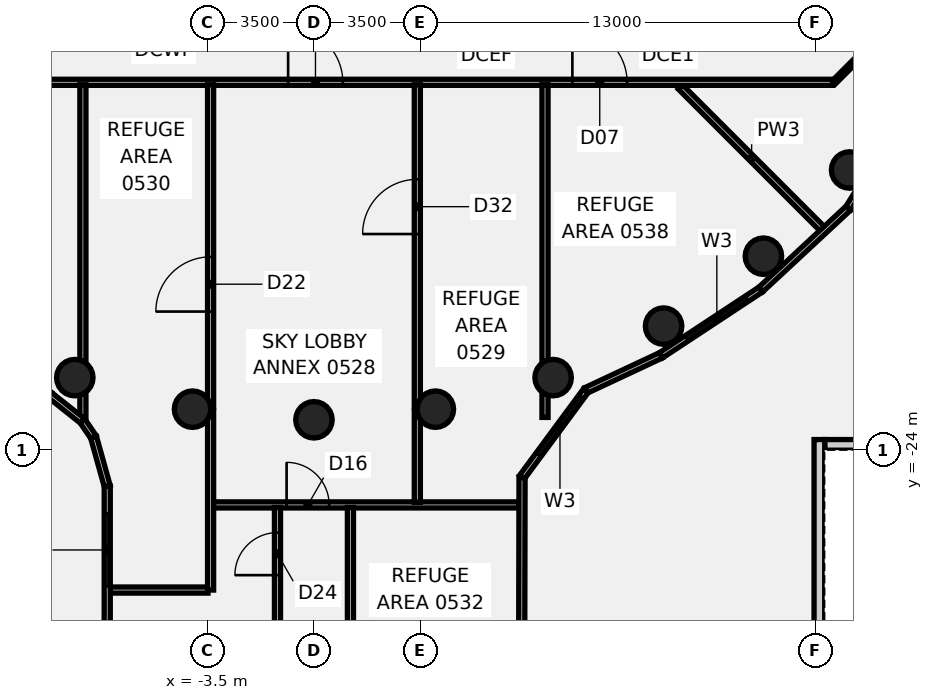
"""IFC4 building model, lengths in metres.
Left out: names, types, materials, properties, quantities, classifications, styles, units other than length and angle.
Written with IfcOpenShell. Run it as: python <this file> out.ifc"""

import sys

from ifc_helpers import new_model, si_unit, direction, frame, frame_2d, origin, origin_2d, place, context, subcontext, project, spatial, rectangle, circle, extrude, element, fill, save


model = new_model("IFC4")
c1 = context("Model", 3, precision=1e-05, world=origin(), true_north=direction((0.0, 1.0)))
c2 = subcontext(c1, "Body", "Model", "MODEL_VIEW")
j1 = project(units=[si_unit("LENGTHUNIT", "METRE"), si_unit("PLANEANGLEUNIT", "RADIAN")], contexts=[c1])
p1 = place(None, origin())
s1 = spatial("IfcSite", under=j1, at=p1, CompositionType="ELEMENT")
p2 = place(p1, origin())
s2 = spatial("IfcBuilding", under=s1, at=p2, CompositionType="ELEMENT")
p3 = place(p2, frame((0.0, 0.0, 29.5)))
s3 = spatial("IfcBuildingStorey", under=s2, at=p3, CompositionType="ELEMENT", Elevation=29.5)
for number, where, z_axis, x_axis in (
    (1, (-7.866, -21.613, -0.6), (0.0, 0.0, 1.0), (1.0, 0.0, 0.0)),
    (2, (-3.994, -22.651, -0.6), (0.0, 0.0, 1.0), (1.0, 0.0, 0.0)),
    (3, (0.0, -23.0, -0.6), (0.0, 0.0, 1.0), (1.0, 0.0, 0.0)),
    (4, (3.994, -22.651, -0.6), (0.0, 0.0, 1.0), (1.0, 0.0, 0.0)),
    (5, (7.866, -21.613, -0.6), (0.0, 0.0, 1.0), (1.0, 0.0, 0.0)),
    (6, (11.5, -19.919, -0.6), (0.0, 0.0, 1.0), (1.0, 0.0, 0.0)),
    (7, (14.784, -17.619, -0.6), (0.0, 0.0, 1.0), (1.0, 0.0, 0.0)),
    (8, (17.619, -14.784, -0.6), (0.0, 0.0, 1.0), (1.0, 0.0, 0.0)),
):
    element("IfcColumn", number, at=place(p3, frame(where, z_axis=z_axis, x_axis=x_axis)), inside=s3, PredefinedType="COLUMN", context=c2, shape_type="SweptSolid", body=[
        extrude(circle(Radius=0.6, at=origin_2d()), origin(), (0.0, 0.0, 1.0), 4.96),
    ])
p4 = place(p3, frame((12.052, -12.052, 0.0), z_axis=(0.0, 0.0, 1.0), x_axis=(0.707106781187, -0.707106781187, 0.0)))
e9 = element("IfcWall", 9, at=p4, inside=s3, PredefinedType="PARTITIONING", context=c2, shape_type="SweptSolid", body=[
    extrude(rectangle(XDim=6.631, YDim=0.2, at=frame_2d((3.315, 0.0))), origin(), (0.0, 0.0, 1.0), 3.76),
])
p5 = place(p3, frame((-17.1, -11.9, 0.0), z_axis=(0.0, 0.0, 1.0), x_axis=(1.0, 0.0, 0.0)))
e10 = element("IfcWall", 10, at=p5, inside=s3, PredefinedType="PARTITIONING", context=c2, shape_type="SweptSolid", body=[
    extrude(rectangle(XDim=34.165, YDim=0.2, at=frame_2d((17.083, 0.0))), origin(), (0.0, 0.0, 1.0), 3.76),
])
p6 = place(p5, frame((16.25, 0.0, 0.0)))
e11 = element("IfcOpeningElement", 11, at=p6, cuts=e10, PredefinedType="OPENING", context=c2, shape_type="SweptSolid", body=[
    extrude(rectangle(XDim=1.8, YDim=2.1, at=frame_2d((0.9, 1.05))), frame((0.0, 0.11, 0.0), z_axis=(0.0, -1.0, 0.0), x_axis=(1.0, 0.0, 0.0)), (0.0, 0.0, 1.0), 0.22),
])
p7 = place(p5, frame((2.1, 0.0, 0.0)))
e12 = element("IfcOpeningElement", 12, at=p7, cuts=e10, PredefinedType="OPENING", context=c2, shape_type="SweptSolid", body=[
    extrude(rectangle(XDim=1.8, YDim=2.1, at=frame_2d((0.9, 1.05))), frame((0.0, 0.11, 0.0), z_axis=(0.0, -1.0, 0.0), x_axis=(1.0, 0.0, 0.0)), (0.0, 0.0, 1.0), 0.22),
])
p8 = place(p5, frame((25.6, 0.0, 0.0)))
e13 = element("IfcOpeningElement", 13, at=p8, cuts=e10, PredefinedType="OPENING", context=c2, shape_type="SweptSolid", body=[
    extrude(rectangle(XDim=1.8, YDim=2.1, at=frame_2d((0.9, 1.05))), frame((0.0, 0.11, 0.0), z_axis=(0.0, -1.0, 0.0), x_axis=(1.0, 0.0, 0.0)), (0.0, 0.0, 1.0), 0.22),
])
p9 = place(p3, frame((-6.699, -28.6, 0.0), z_axis=(0.0, 0.0, 1.0), x_axis=(1.0, 0.0, 0.0)))
e14 = element("IfcWall", 14, at=p9, inside=s3, PredefinedType="PARTITIONING", context=c2, shape_type="SweptSolid", body=[
    extrude(rectangle(XDim=3.214, YDim=0.2, at=frame_2d((1.607, 0.0))), origin(), (0.0, 0.0, 1.0), 3.76),
])
p10 = place(p3, frame((-3.315, -25.8, 0.0), z_axis=(0.0, 0.0, 1.0), x_axis=(1.0, 0.0, 0.0)))
e15 = element("IfcWall", 15, at=p10, inside=s3, PredefinedType="PARTITIONING", context=c2, shape_type="SweptSolid", body=[
    extrude(rectangle(XDim=10.057, YDim=0.2, at=frame_2d((5.028, 0.0))), origin(), (0.0, 0.0, 1.0), 3.76),
])
p11 = place(p10, frame((2.415, 0.0, 0.0)))
e16 = element("IfcOpeningElement", 16, at=p11, cuts=e15, PredefinedType="OPENING", context=c2, shape_type="SweptSolid", body=[
    extrude(rectangle(XDim=1.4, YDim=2.1, at=frame_2d((0.7, 1.05))), frame((0.0, 0.11, 0.0), z_axis=(0.0, -1.0, 0.0), x_axis=(1.0, 0.0, 0.0)), (0.0, 0.0, 1.0), 0.22),
])
p12 = place(p3, frame((17.1, -11.9, 0.0), z_axis=(0.0, 0.0, 1.0), x_axis=(0.707106781187, 0.707106781187, 0.0)))
e17 = element("IfcWall", 17, at=p12, inside=s3, PredefinedType="PARTITIONING", context=c2, shape_type="SweptSolid", body=[
    extrude(rectangle(XDim=2.495, YDim=0.15, at=frame_2d((1.248, 0.0))), origin(), (0.0, 0.0, 1.0), 3.76),
])
p13 = place(p3, frame((-7.6, -22.921, 0.0), z_axis=(0.0, 0.0, 1.0), x_axis=(0.0, 1.0, 0.0)))
e18 = element("IfcWall", 18, at=p13, inside=s3, PredefinedType="PARTITIONING", context=c2, shape_type="SweptSolid", body=[
    extrude(rectangle(XDim=0.769, YDim=0.2, at=frame_2d((0.385, 0.0))), origin(), (0.0, 0.0, 1.0), 3.76),
])
p14 = place(p3, frame((-7.6, -21.074, 0.0), z_axis=(0.0, 0.0, 1.0), x_axis=(0.0, 1.0, 0.0)))
e19 = element("IfcWall", 19, at=p14, inside=s3, PredefinedType="PARTITIONING", context=c2, shape_type="SweptSolid", body=[
    extrude(rectangle(XDim=9.094, YDim=0.2, at=frame_2d((4.547, 0.0))), origin(), (0.0, 0.0, 1.0), 3.76),
])
p15 = place(p3, frame((-3.4, -28.6, 0.0), z_axis=(0.0, 0.0, 1.0), x_axis=(0.0, 1.0, 0.0)))
e20 = element("IfcWall", 20, at=p15, inside=s3, PredefinedType="PARTITIONING", context=c2, shape_type="SweptSolid", body=[
    extrude(rectangle(XDim=5.889, YDim=0.2, at=frame_2d((2.945, 0.0))), origin(), (0.0, 0.0, 1.0), 3.76),
])
p16 = place(p3, frame((-3.4, -22.591, 0.0), z_axis=(0.0, 0.0, 1.0), x_axis=(0.0, 1.0, 0.0)))
e21 = element("IfcWall", 21, at=p16, inside=s3, PredefinedType="PARTITIONING", context=c2, shape_type="SweptSolid", body=[
    extrude(rectangle(XDim=10.611, YDim=0.2, at=frame_2d((5.305, 0.0))), origin(), (0.0, 0.0, 1.0), 3.76),
])
p17 = place(p16, frame((3.15, 0.0, 0.0)))
e22 = element("IfcOpeningElement", 22, at=p17, cuts=e21, PredefinedType="OPENING", context=c2, shape_type="SweptSolid", body=[
    extrude(rectangle(XDim=1.8, YDim=2.1, at=frame_2d((0.9, 1.05))), frame((0.0, 0.11, 0.0), z_axis=(0.0, -1.0, 0.0), x_axis=(1.0, 0.0, 0.0)), (0.0, 0.0, 1.0), 0.22),
])
p18 = place(p3, frame((-1.2, -29.76, 0.0), z_axis=(0.0, 0.0, 1.0), x_axis=(0.0, 1.0, 0.0)))
e23 = element("IfcWall", 23, at=p18, inside=s3, PredefinedType="PARTITIONING", context=c2, shape_type="SweptSolid", body=[
    extrude(rectangle(XDim=3.875, YDim=0.2, at=frame_2d((1.938, 0.0))), origin(), (0.0, 0.0, 1.0), 3.76),
])
p19 = place(p18, frame((1.65, 0.0, 0.0)))
e24 = element("IfcOpeningElement", 24, at=p19, cuts=e23, PredefinedType="OPENING", context=c2, shape_type="SweptSolid", body=[
    extrude(rectangle(XDim=1.4, YDim=2.1, at=frame_2d((0.7, 1.05))), frame((0.0, 0.11, 0.0), z_axis=(0.0, -1.0, 0.0), x_axis=(1.0, 0.0, 0.0)), (0.0, 0.0, 1.0), 0.22),
])
p20 = place(p3, frame((1.2, -39.22, 0.0), z_axis=(0.0, 0.0, 1.0), x_axis=(0.0, 1.0, 0.0)))
e25 = element("IfcWall", 25, at=p20, inside=s3, PredefinedType="PARTITIONING", context=c2, shape_type="SweptSolid", body=[
    extrude(rectangle(XDim=13.335, YDim=0.2, at=frame_2d((6.667, 0.0))), origin(), (0.0, 0.0, 1.0), 3.76),
])
p21 = place(p20, frame((4.12, 0.0, 0.0)))
e26 = element("IfcOpeningElement", 26, at=p21, cuts=e25, PredefinedType="OPENING", context=c2, shape_type="SweptSolid", body=[
    extrude(rectangle(XDim=1.8, YDim=2.1, at=frame_2d((0.9, 1.05))), frame((0.0, 0.11, 0.0), z_axis=(0.0, -1.0, 0.0), x_axis=(1.0, 0.0, 0.0)), (0.0, 0.0, 1.0), 0.22),
])
p22 = place(p3, frame((3.4, -25.715, 0.0), z_axis=(0.0, 0.0, 1.0), x_axis=(0.0, 1.0, 0.0)))
e27 = element("IfcWall", 27, at=p22, inside=s3, PredefinedType="PARTITIONING", context=c2, shape_type="SweptSolid", body=[
    extrude(rectangle(XDim=3.004, YDim=0.2, at=frame_2d((1.502, 0.0))), origin(), (0.0, 0.0, 1.0), 3.76),
])
p23 = place(p3, frame((3.4, -22.591, 0.0), z_axis=(0.0, 0.0, 1.0), x_axis=(0.0, 1.0, 0.0)))
e28 = element("IfcWall", 28, at=p23, inside=s3, PredefinedType="PARTITIONING", context=c2, shape_type="SweptSolid", body=[
    extrude(rectangle(XDim=10.611, YDim=0.2, at=frame_2d((5.305, 0.0))), origin(), (0.0, 0.0, 1.0), 3.76),
])
p24 = place(p23, frame((5.7, 0.0, 0.0)))
e29 = element("IfcOpeningElement", 29, at=p24, cuts=e28, PredefinedType="OPENING", context=c2, shape_type="SweptSolid", body=[
    extrude(rectangle(XDim=1.8, YDim=2.1, at=frame_2d((0.9, 1.05))), frame((0.0, 0.11, 0.0), z_axis=(0.0, -1.0, 0.0), x_axis=(1.0, 0.0, 0.0)), (0.0, 0.0, 1.0), 0.22),
])
p25 = place(p3, frame((7.6, -22.922, 0.0), z_axis=(0.0, 0.0, 1.0), x_axis=(0.0, 1.0, 0.0)))
e30 = element("IfcWall", 30, at=p25, inside=s3, PredefinedType="PARTITIONING", context=c2, shape_type="SweptSolid", body=[
    extrude(rectangle(XDim=0.77, YDim=0.2, at=frame_2d((0.385, 0.0))), origin(), (0.0, 0.0, 1.0), 3.76),
])
p26 = place(p3, frame((7.6, -21.074, 0.0), z_axis=(0.0, 0.0, 1.0), x_axis=(0.0, 1.0, 0.0)))
e31 = element("IfcWall", 31, at=p26, inside=s3, PredefinedType="PARTITIONING", context=c2, shape_type="SweptSolid", body=[
    extrude(rectangle(XDim=9.094, YDim=0.2, at=frame_2d((4.547, 0.0))), origin(), (0.0, 0.0, 1.0), 3.76),
])
p27 = place(p3, frame((16.8, -23.825, 0.0), z_axis=(0.0, 0.0, 1.0), x_axis=(1.0, 0.0, 0.0)))
e32 = element("IfcWall", 32, at=p27, inside=s3, PredefinedType="SOLIDWALL", context=c2, shape_type="SweptSolid", body=[
    extrude(rectangle(XDim=26.7, YDim=0.35, at=frame_2d((13.35, 0.0))), origin(), (0.0, 0.0, 1.0), 1.2),
])
p28 = place(p3, frame((16.625, -42.35, 0.0), z_axis=(0.0, 0.0, 1.0), x_axis=(0.0, 1.0, 0.0)))
e33 = element("IfcWall", 33, at=p28, inside=s3, PredefinedType="SOLIDWALL", context=c2, shape_type="SweptSolid", body=[
    extrude(rectangle(XDim=18.7, YDim=0.35, at=frame_2d((9.35, 0.0))), origin(), (0.0, 0.0, 1.0), 1.2),
])
p29 = place(p3, frame((-8.687, -22.185, 0.0), z_axis=(0.0, 0.0, 1.0), x_axis=(0.782754463559, -0.62233065952, 0.0)))
e34 = element("IfcWall", 34, at=p29, inside=s3, PredefinedType="SOLIDWALL", context=c2, shape_type="SweptSolid", body=[
    extrude(rectangle(XDim=1.374, YDim=0.2, at=frame_2d((0.687, 0.0))), origin(), (0.0, 0.0, 1.0), 4.36),
])
p30 = place(p3, frame((-7.611, -23.041, 0.0), z_axis=(0.0, 0.0, 1.0), x_axis=(0.564082170033, -0.825718659987, 0.0)))
e35 = element("IfcWall", 35, at=p30, inside=s3, PredefinedType="SOLIDWALL", context=c2, shape_type="SweptSolid", body=[
    extrude(rectangle(XDim=0.64, YDim=0.2, at=frame_2d((0.32, 0.0))), origin(), (0.0, 0.0, 1.0), 4.36),
])
p31 = place(p3, frame((-7.25, -23.569, 0.0), z_axis=(0.0, 0.0, 1.0), x_axis=(0.268802114608, -0.963195423153, 0.0)))
e36 = element("IfcWall", 36, at=p31, inside=s3, PredefinedType="SOLIDWALL", context=c2, shape_type="SweptSolid", body=[
    extrude(rectangle(XDim=1.674, YDim=0.2, at=frame_2d((0.837, 0.0))), origin(), (0.0, 0.0, 1.0), 4.36),
])
p32 = place(p3, frame((-6.8, -25.181, 0.0), z_axis=(0.0, 0.0, 1.0), x_axis=(0.0, -1.0, 0.0)))
e37 = element("IfcWall", 37, at=p32, inside=s3, PredefinedType="SOLIDWALL", context=c2, shape_type="SweptSolid", body=[
    extrude(rectangle(XDim=22.3, YDim=0.2, at=frame_2d((11.15, 0.0))), origin(), (0.0, 0.0, 1.0), 4.36),
])
p33 = place(p32, frame((0.9, 0.0, 1.4)))
e38 = element("IfcOpeningElement", 38, at=p33, cuts=e37, PredefinedType="OPENING", context=c2, shape_type="SweptSolid", body=[
    extrude(rectangle(XDim=2.4, YDim=2.1, at=frame_2d((1.2, 1.05))), frame((0.0, 0.11, 0.0), z_axis=(0.0, -1.0, 0.0), x_axis=(1.0, 0.0, 0.0)), (0.0, 0.0, 1.0), 0.22),
])
p34 = place(p3, frame((6.8, -47.481, 0.0), z_axis=(0.0, 0.0, 1.0), x_axis=(0.001966415802, 0.999998066603, 0.0)))
e39 = element("IfcWall", 39, at=p34, inside=s3, PredefinedType="SOLIDWALL", context=c2, shape_type="SweptSolid", body=[
    extrude(rectangle(XDim=22.596, YDim=0.2, at=frame_2d((11.298, 0.0))), origin(), (0.0, 0.0, 1.0), 4.36),
])
p35 = place(p34, frame((3.3, 0.0, 1.4)))
e40 = element("IfcOpeningElement", 40, at=p35, cuts=e39, PredefinedType="OPENING", context=c2, shape_type="SweptSolid", body=[
    extrude(rectangle(XDim=2.4, YDim=2.1, at=frame_2d((1.2, 1.05))), frame((0.0, 0.11, 0.0), z_axis=(0.0, -1.0, 0.0), x_axis=(1.0, 0.0, 0.0)), (0.0, 0.0, 1.0), 0.22),
])
p36 = place(p34, frame((13.75, 0.0, 1.4)))
e41 = element("IfcOpeningElement", 41, at=p36, cuts=e39, PredefinedType="OPENING", context=c2, shape_type="SweptSolid", body=[
    extrude(rectangle(XDim=2.4, YDim=2.1, at=frame_2d((1.2, 1.05))), frame((0.0, 0.11, 0.0), z_axis=(0.0, -1.0, 0.0), x_axis=(1.0, 0.0, 0.0)), (0.0, 0.0, 1.0), 0.22),
])
p37 = place(p3, frame((6.844, -24.885, 0.0), z_axis=(0.0, 0.0, 1.0), x_axis=(0.594098572278, 0.804392246617, 0.0)))
e42 = element("IfcWall", 42, at=p37, inside=s3, PredefinedType="SOLIDWALL", context=c2, shape_type="SweptSolid", body=[
    extrude(rectangle(XDim=3.544, YDim=0.2, at=frame_2d((1.772, 0.0))), origin(), (0.0, 0.0, 1.0), 4.36),
])
p38 = place(p37, frame((0.9, 0.0, 1.4)))
e43 = element("IfcOpeningElement", 43, at=p38, cuts=e42, PredefinedType="OPENING", context=c2, shape_type="SweptSolid", body=[
    extrude(rectangle(XDim=2.4, YDim=2.1, at=frame_2d((1.2, 1.05))), frame((0.0, 0.11, 0.0), z_axis=(0.0, -1.0, 0.0), x_axis=(1.0, 0.0, 0.0)), (0.0, 0.0, 1.0), 0.22),
])
p39 = place(p3, frame((8.95, -22.034, 0.0), z_axis=(0.0, 0.0, 1.0), x_axis=(0.90557737159, 0.424181121769, 0.0)))
e44 = element("IfcWall", 44, at=p39, inside=s3, PredefinedType="SOLIDWALL", context=c2, shape_type="SweptSolid", body=[
    extrude(rectangle(XDim=2.722, YDim=0.2, at=frame_2d((1.361, 0.0))), origin(), (0.0, 0.0, 1.0), 4.36),
])
p40 = place(p3, frame((11.416, -20.879, 0.0), z_axis=(0.0, 0.0, 1.0), x_axis=(0.834783006394, 0.550579088084, 0.0)))
e45 = element("IfcWall", 45, at=p40, inside=s3, PredefinedType="SOLIDWALL", context=c2, shape_type="SweptSolid", body=[
    extrude(rectangle(XDim=3.93, YDim=0.2, at=frame_2d((1.965, 0.0))), origin(), (0.0, 0.0, 1.0), 4.36),
])
p41 = place(p40, frame((1.0, 0.0, 1.4)))
e46 = element("IfcOpeningElement", 46, at=p41, cuts=e45, PredefinedType="OPENING", context=c2, shape_type="SweptSolid", body=[
    extrude(rectangle(XDim=2.4, YDim=2.1, at=frame_2d((1.2, 1.05))), frame((0.0, 0.11, 0.0), z_axis=(0.0, -1.0, 0.0), x_axis=(1.0, 0.0, 0.0)), (0.0, 0.0, 1.0), 0.22),
])
p42 = place(p3, frame((14.696, -18.715, 0.0), z_axis=(0.0, 0.0, 1.0), x_axis=(0.732835527935, 0.680405826691, 0.0)))
e47 = element("IfcWall", 47, at=p42, inside=s3, PredefinedType="SOLIDWALL", context=c2, shape_type="SweptSolid", body=[
    extrude(rectangle(XDim=3.93, YDim=0.2, at=frame_2d((1.965, 0.0))), origin(), (0.0, 0.0, 1.0), 4.36),
])
p43 = place(p3, frame((17.576, -16.041, 0.0), z_axis=(0.0, 0.0, 1.0), x_axis=(0.531032707885, 0.847351322154, 0.0)))
e48 = element("IfcWall", 48, at=p43, inside=s3, PredefinedType="SOLIDWALL", context=c2, shape_type="SweptSolid", body=[
    extrude(rectangle(XDim=8.679, YDim=0.2, at=frame_2d((4.34, 0.0))), origin(), (0.0, 0.0, 1.0), 4.36),
])
p44 = place(p6, origin())
e49 = element("IfcDoor", 49, at=p44, inside=s3, OperationType="DOUBLE_DOOR_SINGLE_SWING", PredefinedType="DOOR", context=c2, shape_type="SweptSolid", body=[
    extrude(rectangle(XDim=1.8, YDim=2.1, at=frame_2d((0.9, 1.05))), frame((0.0, 0.025, 0.0), z_axis=(0.0, -1.0, 0.0), x_axis=(1.0, 0.0, 0.0)), (0.0, 0.0, 1.0), 0.05),
])
fill(e11, e49)
p45 = place(p8, frame((1.8, 0.0, 0.0), z_axis=(0.0, 0.0, 1.0), x_axis=(-1.0, 0.0, 0.0)))
e50 = element("IfcDoor", 50, at=p45, inside=s3, OperationType="DOUBLE_DOOR_SINGLE_SWING", PredefinedType="DOOR", context=c2, shape_type="SweptSolid", body=[
    extrude(rectangle(XDim=1.8, YDim=2.1, at=frame_2d((0.9, 1.05))), frame((0.0, 0.025, 0.0), z_axis=(0.0, -1.0, 0.0), x_axis=(1.0, 0.0, 0.0)), (0.0, 0.0, 1.0), 0.05),
])
fill(e13, e50)
p46 = place(p11, origin())
e51 = element("IfcDoor", 51, at=p46, inside=s3, OperationType="DOUBLE_DOOR_SINGLE_SWING", PredefinedType="DOOR", context=c2, shape_type="SweptSolid", body=[
    extrude(rectangle(XDim=1.4, YDim=2.1, at=frame_2d((0.7, 1.05))), frame((0.0, 0.025, 0.0), z_axis=(0.0, -1.0, 0.0), x_axis=(1.0, 0.0, 0.0)), (0.0, 0.0, 1.0), 0.05),
])
fill(e16, e51)
p47 = place(p17, origin())
e52 = element("IfcDoor", 52, at=p47, inside=s3, OperationType="DOUBLE_DOOR_SINGLE_SWING", PredefinedType="DOOR", context=c2, shape_type="SweptSolid", body=[
    extrude(rectangle(XDim=1.8, YDim=2.1, at=frame_2d((0.9, 1.05))), frame((0.0, 0.025, 0.0), z_axis=(0.0, -1.0, 0.0), x_axis=(1.0, 0.0, 0.0)), (0.0, 0.0, 1.0), 0.05),
])
fill(e22, e52)
p48 = place(p19, origin())
e53 = element("IfcDoor", 53, at=p48, inside=s3, OperationType="DOUBLE_DOOR_SINGLE_SWING", PredefinedType="DOOR", context=c2, shape_type="SweptSolid", body=[
    extrude(rectangle(XDim=1.4, YDim=2.1, at=frame_2d((0.7, 1.05))), frame((0.0, 0.025, 0.0), z_axis=(0.0, -1.0, 0.0), x_axis=(1.0, 0.0, 0.0)), (0.0, 0.0, 1.0), 0.05),
])
fill(e24, e53)
p49 = place(p24, frame((1.8, 0.0, 0.0), z_axis=(0.0, 0.0, 1.0), x_axis=(-1.0, 0.0, 0.0)))
e54 = element("IfcDoor", 54, at=p49, inside=s3, OperationType="DOUBLE_DOOR_SINGLE_SWING", PredefinedType="DOOR", context=c2, shape_type="SweptSolid", body=[
    extrude(rectangle(XDim=1.8, YDim=2.1, at=frame_2d((0.9, 1.05))), frame((0.0, 0.025, 0.0), z_axis=(0.0, -1.0, 0.0), x_axis=(1.0, 0.0, 0.0)), (0.0, 0.0, 1.0), 0.05),
])
fill(e29, e54)
p50 = place(p38, origin())
e55 = element("IfcWindow", 55, at=p50, inside=s3, PartitioningType="SINGLE_PANEL", PredefinedType="WINDOW", context=c2, shape_type="SweptSolid", body=[
    extrude(rectangle(XDim=2.4, YDim=2.1, at=frame_2d((1.2, 1.05))), frame((0.0, 0.03, 0.0), z_axis=(0.0, -1.0, 0.0), x_axis=(1.0, 0.0, 0.0)), (0.0, 0.0, 1.0), 0.06),
])
fill(e43, e55)
p51 = place(p33, origin())
e56 = element("IfcWindow", 56, at=p51, inside=s3, PartitioningType="SINGLE_PANEL", PredefinedType="WINDOW", context=c2, shape_type="SweptSolid", body=[
    extrude(rectangle(XDim=2.4, YDim=2.1, at=frame_2d((1.2, 1.05))), frame((0.0, 0.03, 0.0), z_axis=(0.0, -1.0, 0.0), x_axis=(1.0, 0.0, 0.0)), (0.0, 0.0, 1.0), 0.06),
])
fill(e38, e56)
p52 = place(p41, origin())
e57 = element("IfcWindow", 57, at=p52, inside=s3, PartitioningType="SINGLE_PANEL", PredefinedType="WINDOW", context=c2, shape_type="SweptSolid", body=[
    extrude(rectangle(XDim=2.4, YDim=2.1, at=frame_2d((1.2, 1.05))), frame((0.0, 0.03, 0.0), z_axis=(0.0, -1.0, 0.0), x_axis=(1.0, 0.0, 0.0)), (0.0, 0.0, 1.0), 0.06),
])
fill(e46, e57)
save(model, sys.argv[1])
